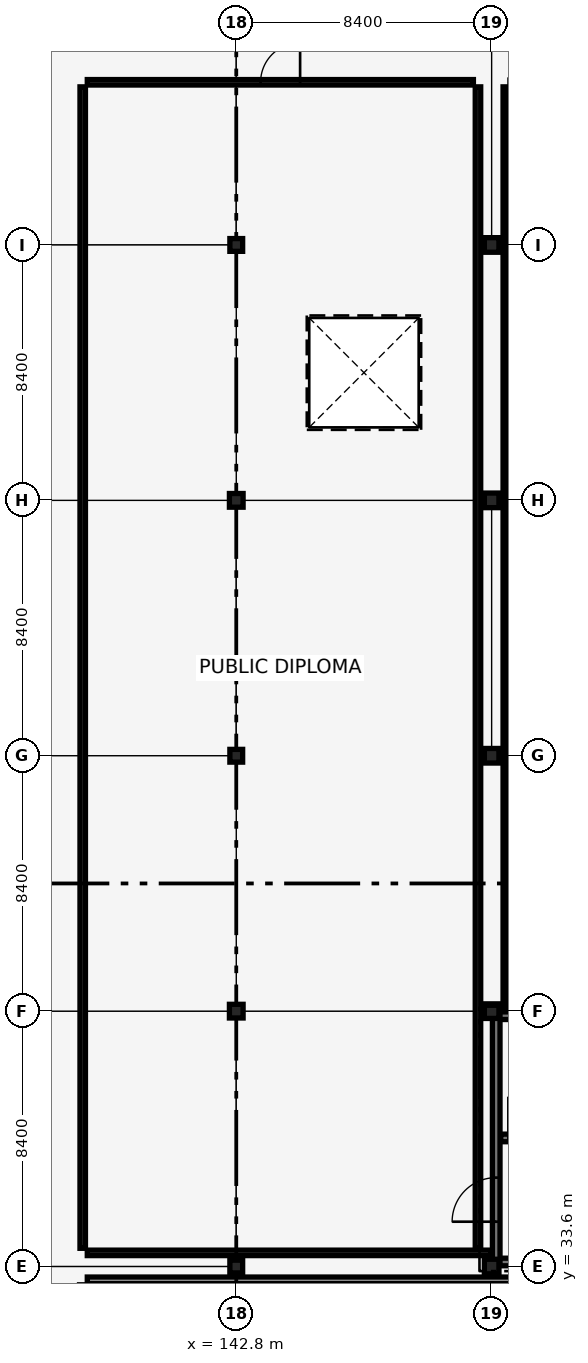
"""IFC4 building model, lengths in metres.
Left out: names, types, materials, properties, quantities, classifications, styles, units other than length and angle.
Written with IfcOpenShell. Run it as: python <this file> out.ifc"""

import sys

from ifc_helpers import new_model, si_unit, direction, frame, frame_2d, origin, origin_2d, place, context, subcontext, project, spatial, rectangle, extrude, element, fill, save


model = new_model("IFC4")
c1 = context("Model", 3, precision=1e-05, world=origin(), true_north=direction((0.0, 1.0)))
c2 = subcontext(c1, "Body", "Model", "MODEL_VIEW")
j1 = project(units=[si_unit("LENGTHUNIT", "METRE"), si_unit("PLANEANGLEUNIT", "RADIAN")], contexts=[c1])
p1 = place(None, origin())
s1 = spatial("IfcSite", under=j1, at=p1, CompositionType="ELEMENT")
p2 = place(p1, origin())
s2 = spatial("IfcBuilding", under=s1, at=p2, CompositionType="ELEMENT")
p3 = place(p2, frame((0.0, 0.0, 26.18)))
s3 = spatial("IfcBuildingStorey", under=s2, at=p3, CompositionType="ELEMENT", Elevation=26.18)
p4 = place(p3, frame((151.35, 33.75, 0.0), z_axis=(0.0, 0.0, 1.0), x_axis=(1.0, 0.0, 0.0)))
e1 = element("IfcWall", 1, at=p4, inside=s3, PredefinedType="SHEAR", context=c2, shape_type="SweptSolid", body=[
    extrude(rectangle(XDim=8.1, YDim=0.25, at=frame_2d((4.05, 0.0))), origin(), (0.0, 0.0, 1.0), 3.84),
])
p5 = place(p4, frame((6.615, 0.0, 0.0)))
e2 = element("IfcOpeningElement", 2, at=p5, cuts=e1, PredefinedType="OPENING", context=c2, shape_type="SweptSolid", body=[
    extrude(rectangle(XDim=1.0, YDim=2.15, at=frame_2d((0.5, 1.075))), frame((0.0, 0.135, 0.0), z_axis=(0.0, -1.0, 0.0), x_axis=(1.0, 0.0, 0.0)), (0.0, 0.0, 1.0), 0.27),
])
p6 = place(p3, frame((151.35, 41.85, 0.0), z_axis=(0.0, 0.0, 1.0), x_axis=(1.0, 0.0, 0.0)))
e3 = element("IfcWall", 3, at=p6, inside=s3, PredefinedType="SHEAR", context=c2, shape_type="SweptSolid", body=[
    extrude(rectangle(XDim=8.1, YDim=0.25, at=frame_2d((4.05, 0.0))), origin(), (0.0, 0.0, 1.0), 3.84),
])
p7 = place(p3, frame((151.35, 33.75, 0.0), z_axis=(0.0, 0.0, 1.0), x_axis=(0.0, 1.0, 0.0)))
e4 = element("IfcWall", 4, at=p7, inside=s3, PredefinedType="SHEAR", context=c2, shape_type="SweptSolid", body=[
    extrude(rectangle(XDim=8.1, YDim=0.25, at=frame_2d((4.05, 0.0))), origin(), (0.0, 0.0, 1.0), 3.84),
])
p8 = place(p7, frame((1.325, 0.0, 0.0)))
e5 = element("IfcOpeningElement", 5, at=p8, cuts=e4, PredefinedType="OPENING", context=c2, shape_type="SweptSolid", body=[
    extrude(rectangle(XDim=1.45, YDim=2.15, at=frame_2d((0.725, 1.075))), frame((0.0, 0.135, 0.0), z_axis=(0.0, -1.0, 0.0), x_axis=(1.0, 0.0, 0.0)), (0.0, 0.0, 1.0), 0.27),
])
p9 = place(p3, frame((151.5, 37.83, 0.0), z_axis=(0.0, 0.0, 1.0), x_axis=(1.0, 0.0, 0.0)))
e6 = element("IfcWall", 6, at=p9, inside=s3, PredefinedType="SHEAR", context=c2, shape_type="SweptSolid", body=[
    extrude(rectangle(XDim=7.8, YDim=0.25, at=frame_2d((3.9, 0.0))), origin(), (0.0, 0.0, 1.0), 3.84),
])
p10 = place(p9, frame((0.25, 0.0, 0.0)))
e7 = element("IfcOpeningElement", 7, at=p10, cuts=e6, PredefinedType="OPENING", context=c2, shape_type="SweptSolid", body=[
    extrude(rectangle(XDim=1.35, YDim=2.15, at=frame_2d((0.675, 1.075))), frame((0.0, 0.135, 0.0), z_axis=(0.0, -1.0, 0.0), x_axis=(1.0, 0.0, 0.0)), (0.0, 0.0, 1.0), 0.27),
])
p11 = place(p3, frame((142.8, 33.6, 0.0), z_axis=(0.0, 0.0, 1.0), x_axis=(1.0, 0.0, 0.0)))
e8 = element("IfcColumn", 8, at=p11, inside=s3, PredefinedType="COLUMN", context=c2, shape_type="SweptSolid", body=[
    extrude(rectangle(XDim=0.42, YDim=0.42, at=origin_2d()), origin(), (0.0, 0.0, 1.0), 3.84),
])
p12 = place(p3, frame((142.8, 42.0, 0.0), z_axis=(0.0, 0.0, 1.0), x_axis=(1.0, 0.0, 0.0)))
e9 = element("IfcColumn", 9, at=p12, inside=s3, PredefinedType="COLUMN", context=c2, shape_type="SweptSolid", body=[
    extrude(rectangle(XDim=0.45, YDim=0.45, at=origin_2d()), origin(), (0.0, 0.0, 1.0), 3.84),
])
p13 = place(p3, frame((142.8, 50.4, 0.0), z_axis=(0.0, 0.0, 1.0), x_axis=(1.0, 0.0, 0.0)))
e10 = element("IfcColumn", 10, at=p13, inside=s3, PredefinedType="COLUMN", context=c2, shape_type="SweptSolid", body=[
    extrude(rectangle(XDim=0.42, YDim=0.42, at=origin_2d()), origin(), (0.0, 0.0, 1.0), 3.84),
])
p14 = place(p3, frame((142.8, 58.8, 0.0), z_axis=(0.0, 0.0, 1.0), x_axis=(1.0, 0.0, 0.0)))
e11 = element("IfcColumn", 11, at=p14, inside=s3, PredefinedType="COLUMN", context=c2, shape_type="SweptSolid", body=[
    extrude(rectangle(XDim=0.45, YDim=0.45, at=origin_2d()), origin(), (0.0, 0.0, 1.0), 3.84),
])
p15 = place(p3, frame((142.8, 67.2, 0.0), z_axis=(0.0, 0.0, 1.0), x_axis=(1.0, 0.0, 0.0)))
e12 = element("IfcColumn", 12, at=p15, inside=s3, PredefinedType="COLUMN", context=c2, shape_type="SweptSolid", body=[
    extrude(rectangle(XDim=0.42, YDim=0.42, at=origin_2d()), origin(), (0.0, 0.0, 1.0), 3.84),
])
for number, where, z_axis, x_axis in (
    (13, (151.2, 33.6, 0.0), (0.0, 0.0, 1.0), (1.0, 0.0, 0.0)),
    (14, (151.2, 42.0, 0.0), (0.0, 0.0, 1.0), (1.0, 0.0, 0.0)),
    (15, (151.2, 50.4, 0.0), (0.0, 0.0, 1.0), (1.0, 0.0, 0.0)),
    (16, (151.2, 58.8, 0.0), (0.0, 0.0, 1.0), (1.0, 0.0, 0.0)),
    (17, (151.2, 67.2, 0.0), (0.0, 0.0, 1.0), (1.0, 0.0, 0.0)),
):
    element("IfcColumn", number, at=place(p3, frame(where, z_axis=z_axis, x_axis=x_axis)), inside=s3, PredefinedType="COLUMN", context=c2, shape_type="SweptSolid", body=[
        extrude(rectangle(XDim=0.48, YDim=0.48, at=origin_2d()), origin(), (0.0, 0.0, 1.0), 3.84),
    ])
p16 = place(p3, frame((137.9, 72.55, 0.0), z_axis=(0.0, 0.0, 1.0), x_axis=(1.0, 0.0, 0.0)))
e18 = element("IfcWall", 18, at=p16, inside=s3, PredefinedType="PARTITIONING", context=c2, shape_type="SweptSolid", body=[
    extrude(rectangle(XDim=12.7, YDim=0.18, at=frame_2d((6.35, 0.0))), origin(), (0.0, 0.0, 1.0), 3.48),
])
p17 = place(p16, frame((5.7, 0.0, 0.0)))
e19 = element("IfcOpeningElement", 19, at=p17, cuts=e18, PredefinedType="OPENING", context=c2, shape_type="SweptSolid", body=[
    extrude(rectangle(XDim=1.3, YDim=2.2, at=frame_2d((0.65, 1.1))), frame((0.0, 0.1, 0.0), z_axis=(0.0, -1.0, 0.0), x_axis=(1.0, 0.0, 0.0)), (0.0, 0.0, 1.0), 0.2),
])
p18 = place(p3, frame((137.75, 34.2, 0.0), z_axis=(0.0, 0.0, 1.0), x_axis=(0.0, 1.0, 0.0)))
e20 = element("IfcWall", 20, at=p18, inside=s3, PredefinedType="PARTITIONING", context=c2, shape_type="SweptSolid", body=[
    extrude(rectangle(XDim=38.2, YDim=0.18, at=frame_2d((19.1, 0.0))), origin(), (0.0, 0.0, 1.0), 3.84),
])
p19 = place(p3, frame((137.9, 34.05, 0.0), z_axis=(0.0, 0.0, 1.0), x_axis=(1.0, 0.0, 0.0)))
e21 = element("IfcWall", 21, at=p19, inside=s3, PredefinedType="PARTITIONING", context=c2, shape_type="SweptSolid", body=[
    extrude(rectangle(XDim=13.27, YDim=0.18, at=frame_2d((6.635, 0.0))), origin(), (0.0, 0.0, 1.0), 3.48),
])
p20 = place(p3, frame((150.75, 34.2, 0.0), z_axis=(0.0, 0.0, 1.0), x_axis=(0.0, 1.0, 0.0)))
e22 = element("IfcWall", 22, at=p20, inside=s3, PredefinedType="PARTITIONING", context=c2, shape_type="SweptSolid", body=[
    extrude(rectangle(XDim=38.2, YDim=0.18, at=frame_2d((19.1, 0.0))), origin(), (0.0, 0.0, 1.0), 3.84),
])
p21 = place(p3, frame((151.65, 42.03, 0.0), z_axis=(0.0, 0.0, 1.0), x_axis=(0.0, 1.0, 0.0)))
e23 = element("IfcWall", 23, at=p21, inside=s3, PredefinedType="PARTITIONING", context=c2, shape_type="SweptSolid", body=[
    extrude(rectangle(XDim=30.37, YDim=0.15, at=frame_2d((15.185, 0.0))), origin(), (0.0, 0.0, 1.0), 3.84),
])
p22 = place(p3, frame((137.9, 33.15, 0.0), z_axis=(0.0, 0.0, 1.0), x_axis=(1.0, 0.0, 0.0)))
e24 = element("IfcWall", 24, at=p22, inside=s3, PredefinedType="PARTITIONING", context=c2, shape_type="SweptSolid", body=[
    extrude(rectangle(XDim=21.52, YDim=0.21, at=frame_2d((10.76, 0.0))), origin(), (0.0, 0.0, 1.0), 3.48),
])
p23 = place(p8, origin())
e25 = element("IfcDoor", 25, at=p23, inside=s3, OperationType="DOUBLE_DOOR_SINGLE_SWING", PredefinedType="DOOR", context=c2, shape_type="SweptSolid", body=[
    extrude(rectangle(XDim=1.45, YDim=2.15, at=frame_2d((0.725, 1.075))), frame((0.0, 0.025, 0.0), z_axis=(0.0, -1.0, 0.0), x_axis=(1.0, 0.0, 0.0)), (0.0, 0.0, 1.0), 0.05),
])
fill(e5, e25)
p24 = place(p17, origin())
e26 = element("IfcDoor", 26, at=p24, inside=s3, OperationType="SINGLE_SWING_RIGHT", PredefinedType="DOOR", context=c2, shape_type="SweptSolid", body=[
    extrude(rectangle(XDim=1.3, YDim=2.2, at=frame_2d((0.65, 1.1))), frame((0.0, 0.025, 0.0), z_axis=(0.0, -1.0, 0.0), x_axis=(1.0, 0.0, 0.0)), (0.0, 0.0, 1.0), 0.05),
])
fill(e19, e26)
save(model, sys.argv[1])
